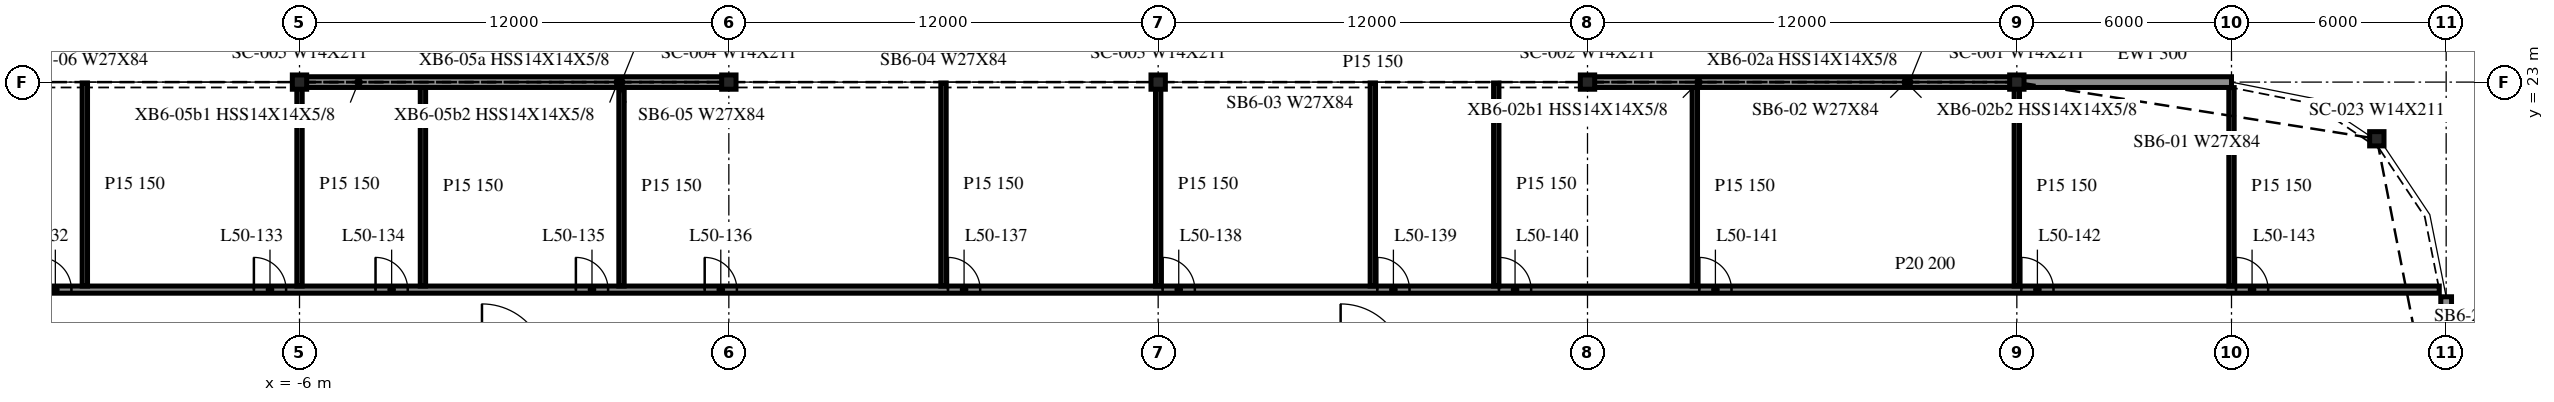
"""IFC4 building model, lengths in metres.
Left out: names, types, materials, properties, quantities, classifications, styles, units other than length and angle.
Written with IfcOpenShell. Run it as: python <this file> out.ifc"""

import sys

from ifc_helpers import new_model, si_unit, direction, frame, frame_2d, origin, origin_2d, place, context, subcontext, project, spatial, rectangle, i_section, extrude, element, fill, save


model = new_model("IFC4")
c1 = context("Model", 3, precision=1e-05, world=origin(), true_north=direction((0.0, 1.0)))
c2 = subcontext(c1, "Body", "Model", "MODEL_VIEW")
j1 = project(units=[si_unit("LENGTHUNIT", "METRE"), si_unit("PLANEANGLEUNIT", "RADIAN")], contexts=[c1])
p1 = place(None, origin())
s1 = spatial("IfcSite", under=j1, at=p1, CompositionType="ELEMENT")
p2 = place(p1, origin())
s2 = spatial("IfcBuilding", under=s1, at=p2, CompositionType="ELEMENT")
p3 = place(p2, frame((0.0, 0.0, 209.1)))
s3 = spatial("IfcBuildingStorey", under=s2, at=p3, CompositionType="ELEMENT", Elevation=209.1)
for number, where, z_axis, x_axis in (
    (1, (52.062, 21.416, -0.34), (0.0, 0.0, 1.0), (1.0, 0.0, 0.0)),
    (2, (42.0, 23.0, -0.34), (0.0, 0.0, 1.0), (1.0, 0.0, 0.0)),
    (3, (30.0, 23.0, -0.34), (0.0, 0.0, 1.0), (1.0, 0.0, 0.0)),
    (4, (18.0, 23.0, -0.34), (0.0, 0.0, 1.0), (1.0, 0.0, 0.0)),
    (5, (6.0, 23.0, -0.34), (0.0, 0.0, 1.0), (1.0, 0.0, 0.0)),
    (6, (-6.0, 23.0, -0.34), (0.0, 0.0, 1.0), (1.0, 0.0, 0.0)),
):
    element("IfcColumn", number, at=place(p3, frame(where, z_axis=z_axis, x_axis=x_axis)), inside=s3, PredefinedType="COLUMN", context=c2, shape_type="SweptSolid", body=[
        extrude(i_section(OverallWidth=0.401, OverallDepth=0.399, WebThickness=0.025, FlangeThickness=0.04, at=origin_2d()), origin(), (0.0, 0.0, 1.0), 3.8),
    ])
p4 = place(p3, frame((48.0, 23.0, 0.0), z_axis=(0.0, 0.0, 1.0), x_axis=(-1.0, 0.0, 0.0)))
e7 = element("IfcWall", 7, at=p4, inside=s3, PredefinedType="NOTDEFINED", context=c2, shape_type="SweptSolid", body=[
    extrude(rectangle(XDim=5.988, YDim=0.3, at=frame_2d((2.994, 0.0))), origin(), (0.0, 0.0, 1.0), 2.782),
])
for number, where, z_axis, x_axis in (
    (8, (41.988, 23.0, 0.0), (0.0, 0.0, 1.0), (-1.0, 0.0, 0.0)),
    (9, (5.988, 23.0, 0.0), (0.0, 0.0, 1.0), (-1.0, 0.0, 0.0)),
):
    element("IfcWall", number, at=place(p3, frame(where, z_axis=z_axis, x_axis=x_axis)), inside=s3, PredefinedType="NOTDEFINED", context=c2, shape_type="SweptSolid", body=[
        extrude(rectangle(XDim=11.975, YDim=0.3, at=frame_2d((5.988, 0.0))), origin(), (0.0, 0.0, 1.0), 2.782),
    ])
p5 = place(p3, frame((54.0, 11.7, 0.0), z_axis=(0.0, 0.0, 1.0), x_axis=(0.0, 1.0, 0.0)))
e10 = element("IfcWall", 10, at=p5, inside=s3, PredefinedType="NOTDEFINED", context=c2, shape_type="SweptSolid", body=[
    extrude(rectangle(XDim=5.3, YDim=0.3, at=frame_2d((2.65, 0.0))), origin(), (0.0, 0.0, 1.0), 2.782),
])
p6 = place(p3, frame((-41.975, 17.2, 0.0), z_axis=(0.0, 0.0, 1.0), x_axis=(1.0, 0.0, 0.0)))
e11 = element("IfcWall", 11, at=p6, inside=s3, PredefinedType="PARTITIONING", context=c2, shape_type="SweptSolid", body=[
    extrude(rectangle(XDim=95.782, YDim=0.2, at=frame_2d((47.891, 0.0))), origin(), (0.0, 0.0, 1.0), 3.46),
])
p7 = place(p6, frame((4.7, 0.0, 0.0)))
e12 = element("IfcOpeningElement", 12, at=p7, cuts=e11, PredefinedType="OPENING", context=c2, shape_type="SweptSolid", body=[
    extrude(rectangle(XDim=0.9, YDim=2.1, at=frame_2d((0.45, 1.05))), frame((0.0, 0.11, 0.0), z_axis=(0.0, -1.0, 0.0), x_axis=(1.0, 0.0, 0.0)), (0.0, 0.0, 1.0), 0.22),
])
p8 = place(p6, frame((8.1, 0.0, 0.0)))
e13 = element("IfcOpeningElement", 13, at=p8, cuts=e11, PredefinedType="OPENING", context=c2, shape_type="SweptSolid", body=[
    extrude(rectangle(XDim=0.9, YDim=2.1, at=frame_2d((0.45, 1.05))), frame((0.0, 0.11, 0.0), z_axis=(0.0, -1.0, 0.0), x_axis=(1.0, 0.0, 0.0)), (0.0, 0.0, 1.0), 0.22),
])
p9 = place(p6, frame((14.1, 0.0, 0.0)))
e14 = element("IfcOpeningElement", 14, at=p9, cuts=e11, PredefinedType="OPENING", context=c2, shape_type="SweptSolid", body=[
    extrude(rectangle(XDim=0.9, YDim=2.1, at=frame_2d((0.45, 1.05))), frame((0.0, 0.11, 0.0), z_axis=(0.0, -1.0, 0.0), x_axis=(1.0, 0.0, 0.0)), (0.0, 0.0, 1.0), 0.22),
])
p10 = place(p6, frame((22.7, 0.0, 0.0)))
e15 = element("IfcOpeningElement", 15, at=p10, cuts=e11, PredefinedType="OPENING", context=c2, shape_type="SweptSolid", body=[
    extrude(rectangle(XDim=0.9, YDim=2.1, at=frame_2d((0.45, 1.05))), frame((0.0, 0.11, 0.0), z_axis=(0.0, -1.0, 0.0), x_axis=(1.0, 0.0, 0.0)), (0.0, 0.0, 1.0), 0.22),
])
p11 = place(p6, frame((28.7, 0.0, 0.0)))
e16 = element("IfcOpeningElement", 16, at=p11, cuts=e11, PredefinedType="OPENING", context=c2, shape_type="SweptSolid", body=[
    extrude(rectangle(XDim=0.9, YDim=2.1, at=frame_2d((0.45, 1.05))), frame((0.0, 0.11, 0.0), z_axis=(0.0, -1.0, 0.0), x_axis=(1.0, 0.0, 0.0)), (0.0, 0.0, 1.0), 0.22),
])
p12 = place(p6, frame((34.7, 0.0, 0.0)))
e17 = element("IfcOpeningElement", 17, at=p12, cuts=e11, PredefinedType="OPENING", context=c2, shape_type="SweptSolid", body=[
    extrude(rectangle(XDim=0.9, YDim=2.1, at=frame_2d((0.45, 1.05))), frame((0.0, 0.11, 0.0), z_axis=(0.0, -1.0, 0.0), x_axis=(1.0, 0.0, 0.0)), (0.0, 0.0, 1.0), 0.22),
])
p13 = place(p6, frame((38.1, 0.0, 0.0)))
e18 = element("IfcOpeningElement", 18, at=p13, cuts=e11, PredefinedType="OPENING", context=c2, shape_type="SweptSolid", body=[
    extrude(rectangle(XDim=0.9, YDim=2.1, at=frame_2d((0.45, 1.05))), frame((0.0, 0.11, 0.0), z_axis=(0.0, -1.0, 0.0), x_axis=(1.0, 0.0, 0.0)), (0.0, 0.0, 1.0), 0.22),
])
p14 = place(p6, frame((43.7, 0.0, 0.0)))
e19 = element("IfcOpeningElement", 19, at=p14, cuts=e11, PredefinedType="OPENING", context=c2, shape_type="SweptSolid", body=[
    extrude(rectangle(XDim=0.9, YDim=2.1, at=frame_2d((0.45, 1.05))), frame((0.0, 0.11, 0.0), z_axis=(0.0, -1.0, 0.0), x_axis=(1.0, 0.0, 0.0)), (0.0, 0.0, 1.0), 0.22),
])
p15 = place(p6, frame((47.3, 0.0, 0.0)))
e20 = element("IfcOpeningElement", 20, at=p15, cuts=e11, PredefinedType="OPENING", context=c2, shape_type="SweptSolid", body=[
    extrude(rectangle(XDim=0.9, YDim=2.1, at=frame_2d((0.45, 1.05))), frame((0.0, 0.11, 0.0), z_axis=(0.0, -1.0, 0.0), x_axis=(1.0, 0.0, 0.0)), (0.0, 0.0, 1.0), 0.22),
])
p16 = place(p6, frame((54.1, 0.0, 0.0)))
e21 = element("IfcOpeningElement", 21, at=p16, cuts=e11, PredefinedType="OPENING", context=c2, shape_type="SweptSolid", body=[
    extrude(rectangle(XDim=0.9, YDim=2.1, at=frame_2d((0.45, 1.05))), frame((0.0, 0.11, 0.0), z_axis=(0.0, -1.0, 0.0), x_axis=(1.0, 0.0, 0.0)), (0.0, 0.0, 1.0), 0.22),
])
p17 = place(p6, frame((60.1, 0.0, 0.0)))
e22 = element("IfcOpeningElement", 22, at=p17, cuts=e11, PredefinedType="OPENING", context=c2, shape_type="SweptSolid", body=[
    extrude(rectangle(XDim=0.9, YDim=2.1, at=frame_2d((0.45, 1.05))), frame((0.0, 0.11, 0.0), z_axis=(0.0, -1.0, 0.0), x_axis=(1.0, 0.0, 0.0)), (0.0, 0.0, 1.0), 0.22),
])
p18 = place(p6, frame((66.1, 0.0, 0.0)))
e23 = element("IfcOpeningElement", 23, at=p18, cuts=e11, PredefinedType="OPENING", context=c2, shape_type="SweptSolid", body=[
    extrude(rectangle(XDim=0.9, YDim=2.1, at=frame_2d((0.45, 1.05))), frame((0.0, 0.11, 0.0), z_axis=(0.0, -1.0, 0.0), x_axis=(1.0, 0.0, 0.0)), (0.0, 0.0, 1.0), 0.22),
])
p19 = place(p6, frame((69.5, 0.0, 0.0)))
e24 = element("IfcOpeningElement", 24, at=p19, cuts=e11, PredefinedType="OPENING", context=c2, shape_type="SweptSolid", body=[
    extrude(rectangle(XDim=0.9, YDim=2.1, at=frame_2d((0.45, 1.05))), frame((0.0, 0.11, 0.0), z_axis=(0.0, -1.0, 0.0), x_axis=(1.0, 0.0, 0.0)), (0.0, 0.0, 1.0), 0.22),
])
p20 = place(p6, frame((75.1, 0.0, 0.0)))
e25 = element("IfcOpeningElement", 25, at=p20, cuts=e11, PredefinedType="OPENING", context=c2, shape_type="SweptSolid", body=[
    extrude(rectangle(XDim=0.9, YDim=2.1, at=frame_2d((0.45, 1.05))), frame((0.0, 0.11, 0.0), z_axis=(0.0, -1.0, 0.0), x_axis=(1.0, 0.0, 0.0)), (0.0, 0.0, 1.0), 0.22),
])
p21 = place(p6, frame((84.1, 0.0, 0.0)))
e26 = element("IfcOpeningElement", 26, at=p21, cuts=e11, PredefinedType="OPENING", context=c2, shape_type="SweptSolid", body=[
    extrude(rectangle(XDim=0.9, YDim=2.1, at=frame_2d((0.45, 1.05))), frame((0.0, 0.11, 0.0), z_axis=(0.0, -1.0, 0.0), x_axis=(1.0, 0.0, 0.0)), (0.0, 0.0, 1.0), 0.22),
])
p22 = place(p6, frame((90.1, 0.0, 0.0)))
e27 = element("IfcOpeningElement", 27, at=p22, cuts=e11, PredefinedType="OPENING", context=c2, shape_type="SweptSolid", body=[
    extrude(rectangle(XDim=0.9, YDim=2.1, at=frame_2d((0.45, 1.05))), frame((0.0, 0.11, 0.0), z_axis=(0.0, -1.0, 0.0), x_axis=(1.0, 0.0, 0.0)), (0.0, 0.0, 1.0), 0.22),
])
for number, where, z_axis, x_axis in (
    (28, (-12.0, 17.3, 0.0), (0.0, 0.0, 1.0), (0.0, 1.0, 0.0)),
    (29, (-6.0, 17.3, 0.0), (0.0, 0.0, 1.0), (0.0, 1.0, 0.0)),
):
    element("IfcWall", number, at=place(p3, frame(where, z_axis=z_axis, x_axis=x_axis)), inside=s3, PredefinedType="PARTITIONING", context=c2, shape_type="SweptSolid", body=[
        extrude(rectangle(XDim=5.675, YDim=0.15, at=frame_2d((2.837, 0.0))), origin(), (0.0, 0.0, 1.0), 3.46),
    ])
for number, where, z_axis, x_axis in (
    (30, (-2.55, 17.3, 0.0), (0.0, 0.0, 1.0), (0.0, 1.0, 0.0)),
    (31, (3.0, 17.3, 0.0), (0.0, 0.0, 1.0), (0.0, 1.0, 0.0)),
):
    element("IfcWall", number, at=place(p3, frame(where, z_axis=z_axis, x_axis=x_axis)), inside=s3, PredefinedType="PARTITIONING", context=c2, shape_type="SweptSolid", body=[
        extrude(rectangle(XDim=5.55, YDim=0.15, at=frame_2d((2.775, 0.0))), origin(), (0.0, 0.0, 1.0), 3.46),
    ])
for number, where, z_axis, x_axis in (
    (32, (12.0, 17.3, 0.0), (0.0, 0.0, 1.0), (0.0, 1.0, 0.0)),
    (33, (18.0, 17.3, 0.0), (0.0, 0.0, 1.0), (0.0, 1.0, 0.0)),
    (34, (24.0, 17.3, 0.0), (0.0, 0.0, 1.0), (0.0, 1.0, 0.0)),
    (35, (27.45, 17.3, 0.0), (0.0, 0.0, 1.0), (0.0, 1.0, 0.0)),
):
    element("IfcWall", number, at=place(p3, frame(where, z_axis=z_axis, x_axis=x_axis)), inside=s3, PredefinedType="PARTITIONING", context=c2, shape_type="SweptSolid", body=[
        extrude(rectangle(XDim=5.675, YDim=0.15, at=frame_2d((2.837, 0.0))), origin(), (0.0, 0.0, 1.0), 3.46),
    ])
for number, where, z_axis, x_axis in (
    (36, (33.0, 17.3, 0.0), (0.0, 0.0, 1.0), (0.0, 1.0, 0.0)),
    (37, (42.0, 17.3, 0.0), (0.0, 0.0, 1.0), (0.0, 1.0, 0.0)),
):
    element("IfcWall", number, at=place(p3, frame(where, z_axis=z_axis, x_axis=x_axis)), inside=s3, PredefinedType="PARTITIONING", context=c2, shape_type="SweptSolid", body=[
        extrude(rectangle(XDim=5.55, YDim=0.15, at=frame_2d((2.775, 0.0))), origin(), (0.0, 0.0, 1.0), 3.46),
    ])
p23 = place(p3, frame((48.0, 17.3, 0.0), z_axis=(0.0, 0.0, 1.0), x_axis=(0.0, 1.0, 0.0)))
e38 = element("IfcWall", 38, at=p23, inside=s3, PredefinedType="PARTITIONING", context=c2, shape_type="SweptSolid", body=[
    extrude(rectangle(XDim=5.547, YDim=0.15, at=frame_2d((2.773, 0.0))), origin(), (0.0, 0.0, 1.0), 3.46),
])
p24 = place(p11, origin())
e39 = element("IfcDoor", 39, at=p24, inside=s3, OperationType="SINGLE_SWING_LEFT", PredefinedType="DOOR", context=c2, shape_type="SweptSolid", body=[
    extrude(rectangle(XDim=0.9, YDim=2.1, at=frame_2d((0.45, 1.05))), frame((0.0, 0.025, 0.0), z_axis=(0.0, -1.0, 0.0), x_axis=(1.0, 0.0, 0.0)), (0.0, 0.0, 1.0), 0.05),
])
fill(e16, e39)
p25 = place(p12, origin())
e40 = element("IfcDoor", 40, at=p25, inside=s3, OperationType="SINGLE_SWING_LEFT", PredefinedType="DOOR", context=c2, shape_type="SweptSolid", body=[
    extrude(rectangle(XDim=0.9, YDim=2.1, at=frame_2d((0.45, 1.05))), frame((0.0, 0.025, 0.0), z_axis=(0.0, -1.0, 0.0), x_axis=(1.0, 0.0, 0.0)), (0.0, 0.0, 1.0), 0.05),
])
fill(e17, e40)
p26 = place(p13, origin())
e41 = element("IfcDoor", 41, at=p26, inside=s3, OperationType="SINGLE_SWING_LEFT", PredefinedType="DOOR", context=c2, shape_type="SweptSolid", body=[
    extrude(rectangle(XDim=0.9, YDim=2.1, at=frame_2d((0.45, 1.05))), frame((0.0, 0.025, 0.0), z_axis=(0.0, -1.0, 0.0), x_axis=(1.0, 0.0, 0.0)), (0.0, 0.0, 1.0), 0.05),
])
fill(e18, e41)
p27 = place(p14, origin())
e42 = element("IfcDoor", 42, at=p27, inside=s3, OperationType="SINGLE_SWING_LEFT", PredefinedType="DOOR", context=c2, shape_type="SweptSolid", body=[
    extrude(rectangle(XDim=0.9, YDim=2.1, at=frame_2d((0.45, 1.05))), frame((0.0, 0.025, 0.0), z_axis=(0.0, -1.0, 0.0), x_axis=(1.0, 0.0, 0.0)), (0.0, 0.0, 1.0), 0.05),
])
fill(e19, e42)
p28 = place(p15, origin())
e43 = element("IfcDoor", 43, at=p28, inside=s3, OperationType="SINGLE_SWING_LEFT", PredefinedType="DOOR", context=c2, shape_type="SweptSolid", body=[
    extrude(rectangle(XDim=0.9, YDim=2.1, at=frame_2d((0.45, 1.05))), frame((0.0, 0.025, 0.0), z_axis=(0.0, -1.0, 0.0), x_axis=(1.0, 0.0, 0.0)), (0.0, 0.0, 1.0), 0.05),
])
fill(e20, e43)
p29 = place(p16, origin())
e44 = element("IfcDoor", 44, at=p29, inside=s3, OperationType="SINGLE_SWING_RIGHT", PredefinedType="DOOR", context=c2, shape_type="SweptSolid", body=[
    extrude(rectangle(XDim=0.9, YDim=2.1, at=frame_2d((0.45, 1.05))), frame((0.0, 0.025, 0.0), z_axis=(0.0, -1.0, 0.0), x_axis=(1.0, 0.0, 0.0)), (0.0, 0.0, 1.0), 0.05),
])
fill(e21, e44)
p30 = place(p17, origin())
e45 = element("IfcDoor", 45, at=p30, inside=s3, OperationType="SINGLE_SWING_RIGHT", PredefinedType="DOOR", context=c2, shape_type="SweptSolid", body=[
    extrude(rectangle(XDim=0.9, YDim=2.1, at=frame_2d((0.45, 1.05))), frame((0.0, 0.025, 0.0), z_axis=(0.0, -1.0, 0.0), x_axis=(1.0, 0.0, 0.0)), (0.0, 0.0, 1.0), 0.05),
])
fill(e22, e45)
p31 = place(p18, origin())
e46 = element("IfcDoor", 46, at=p31, inside=s3, OperationType="SINGLE_SWING_RIGHT", PredefinedType="DOOR", context=c2, shape_type="SweptSolid", body=[
    extrude(rectangle(XDim=0.9, YDim=2.1, at=frame_2d((0.45, 1.05))), frame((0.0, 0.025, 0.0), z_axis=(0.0, -1.0, 0.0), x_axis=(1.0, 0.0, 0.0)), (0.0, 0.0, 1.0), 0.05),
])
fill(e23, e46)
p32 = place(p19, origin())
e47 = element("IfcDoor", 47, at=p32, inside=s3, OperationType="SINGLE_SWING_RIGHT", PredefinedType="DOOR", context=c2, shape_type="SweptSolid", body=[
    extrude(rectangle(XDim=0.9, YDim=2.1, at=frame_2d((0.45, 1.05))), frame((0.0, 0.025, 0.0), z_axis=(0.0, -1.0, 0.0), x_axis=(1.0, 0.0, 0.0)), (0.0, 0.0, 1.0), 0.05),
])
fill(e24, e47)
p33 = place(p20, origin())
e48 = element("IfcDoor", 48, at=p33, inside=s3, OperationType="SINGLE_SWING_RIGHT", PredefinedType="DOOR", context=c2, shape_type="SweptSolid", body=[
    extrude(rectangle(XDim=0.9, YDim=2.1, at=frame_2d((0.45, 1.05))), frame((0.0, 0.025, 0.0), z_axis=(0.0, -1.0, 0.0), x_axis=(1.0, 0.0, 0.0)), (0.0, 0.0, 1.0), 0.05),
])
fill(e25, e48)
p34 = place(p21, origin())
e49 = element("IfcDoor", 49, at=p34, inside=s3, OperationType="SINGLE_SWING_RIGHT", PredefinedType="DOOR", context=c2, shape_type="SweptSolid", body=[
    extrude(rectangle(XDim=0.9, YDim=2.1, at=frame_2d((0.45, 1.05))), frame((0.0, 0.025, 0.0), z_axis=(0.0, -1.0, 0.0), x_axis=(1.0, 0.0, 0.0)), (0.0, 0.0, 1.0), 0.05),
])
fill(e26, e49)
p35 = place(p22, origin())
e50 = element("IfcDoor", 50, at=p35, inside=s3, OperationType="SINGLE_SWING_RIGHT", PredefinedType="DOOR", context=c2, shape_type="SweptSolid", body=[
    extrude(rectangle(XDim=0.9, YDim=2.1, at=frame_2d((0.45, 1.05))), frame((0.0, 0.025, 0.0), z_axis=(0.0, -1.0, 0.0), x_axis=(1.0, 0.0, 0.0)), (0.0, 0.0, 1.0), 0.05),
])
fill(e27, e50)
save(model, sys.argv[1])
